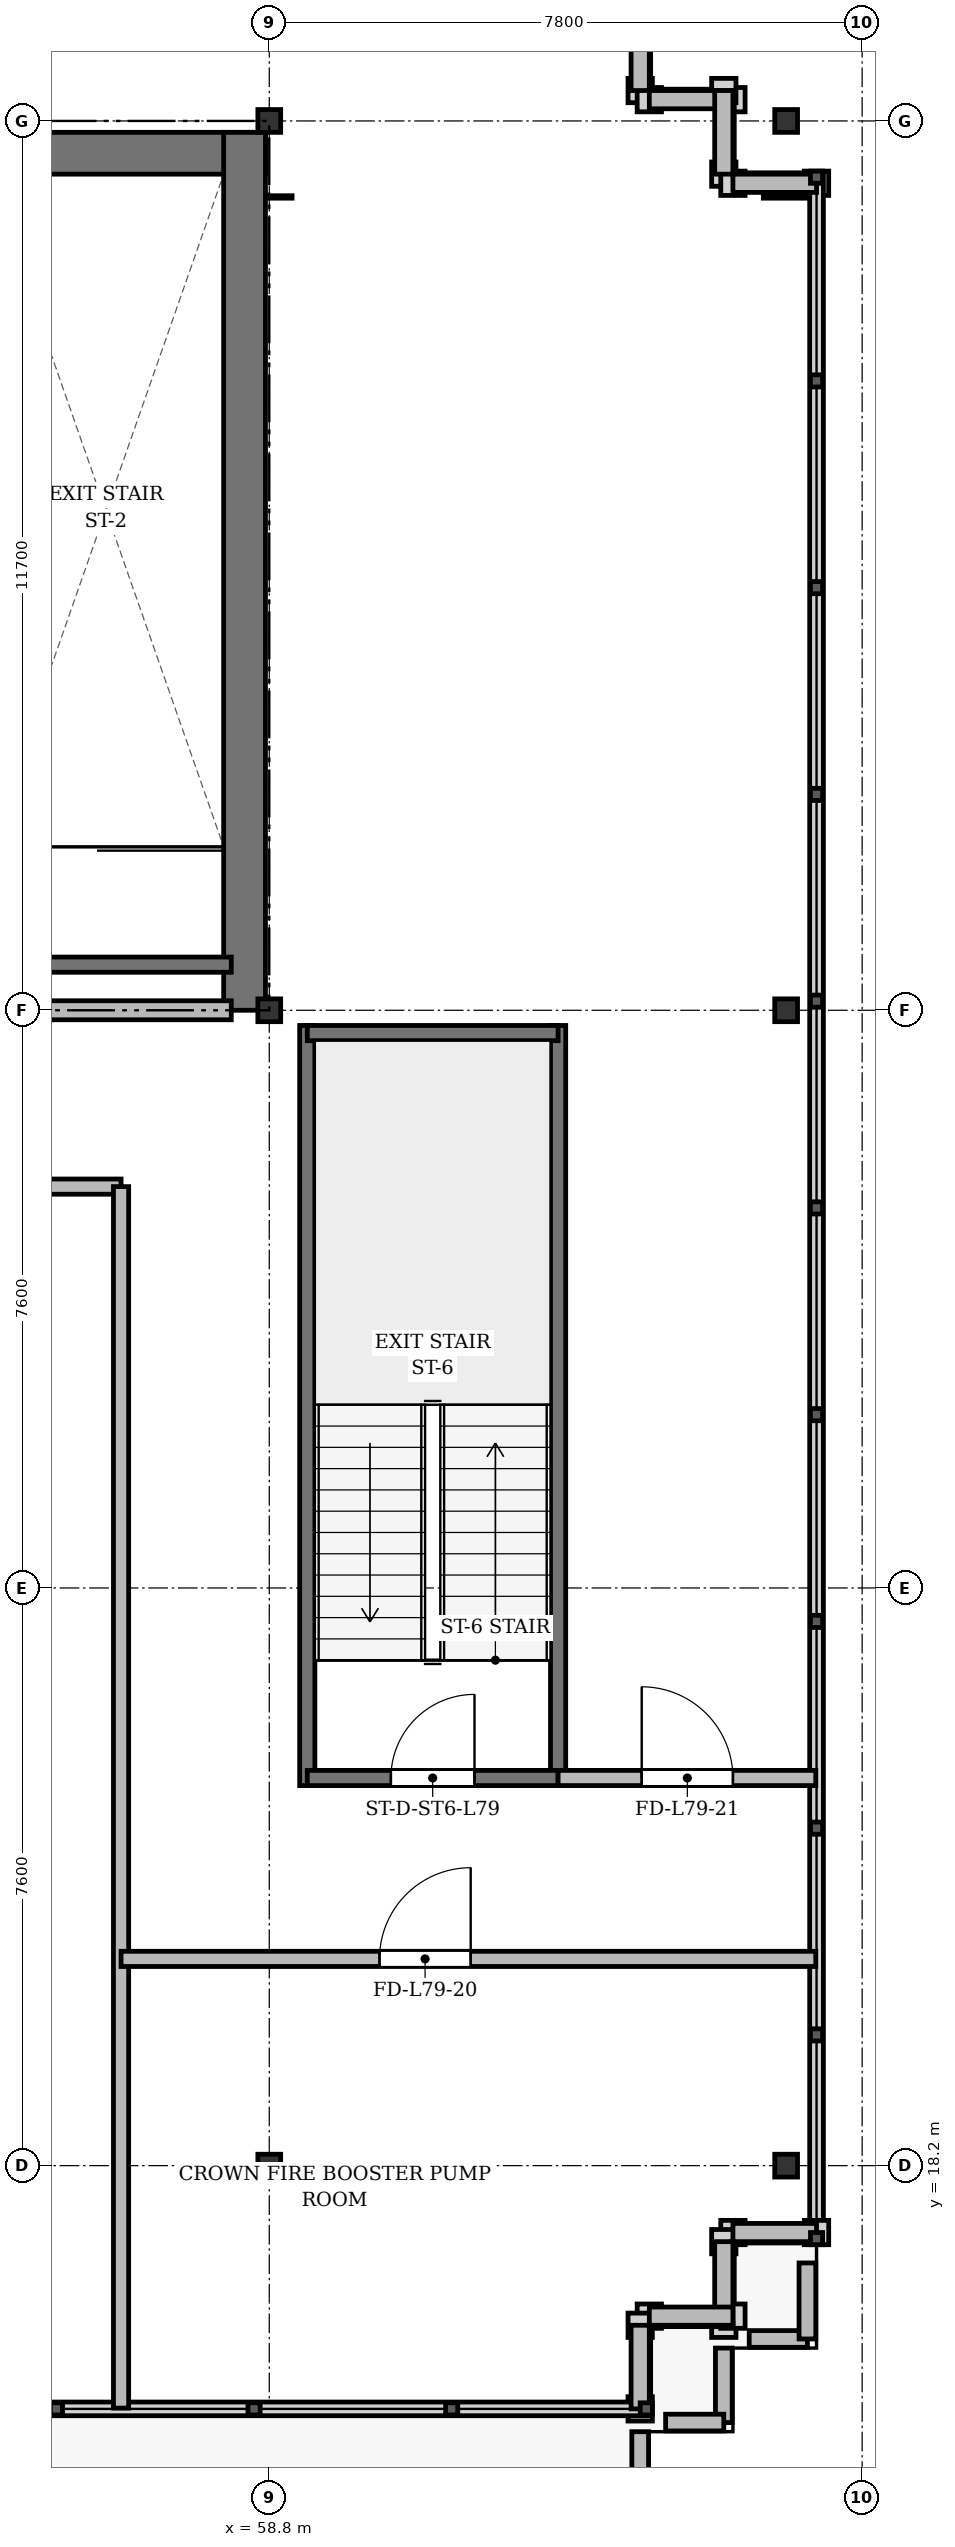
"""IFC4 building model, lengths in metres.
Left out: names, types, materials, properties, quantities, classifications, styles, units other than length and angle.
Written with IfcOpenShell. Run it as: python <this file> out.ifc"""

import sys

from ifc_helpers import new_model, si_unit, direction, frame, frame_2d, origin, origin_2d, place, context, subcontext, project, spatial, rectangle, i_section, extrude, source, transform, mapped, element, fill, save


model = new_model("IFC4")
c1 = context("Model", 3, precision=1e-05, world=origin(), true_north=direction((0.0, 1.0)))
c2 = subcontext(c1, "Body", "Model", "MODEL_VIEW")
j1 = project(units=[si_unit("LENGTHUNIT", "METRE"), si_unit("PLANEANGLEUNIT", "RADIAN")], contexts=[c1])
p1 = place(None, origin())
s1 = spatial("IfcSite", under=j1, at=p1, CompositionType="ELEMENT")
p2 = place(p1, origin())
s2 = spatial("IfcBuilding", under=s1, at=p2, CompositionType="ELEMENT")
p3 = place(p2, frame((0.0, 0.0, 303.5)))
s3 = spatial("IfcBuildingStorey", under=s2, at=p3, CompositionType="ELEMENT", Elevation=303.5)
m1 = source(origin(), c2, "Body", "SweptSolid", [
    extrude(i_section(OverallWidth=0.3, OverallDepth=0.3, WebThickness=0.015, FlangeThickness=0.024, at=origin_2d()), origin(), (0.0, 0.0, 1.0), 4.4),
])
for number, where, z_axis, x_axis in (
    (1, (58.8, 18.2, 0.0), (0.0, 0.0, 1.0), (1.0, 0.0, 0.0)),
    (2, (58.8, 33.4, 0.0), (0.0, 0.0, 1.0), (1.0, 0.0, 0.0)),
    (3, (58.8, 45.1, 0.0), (0.0, 0.0, 1.0), (1.0, 0.0, 0.0)),
    (4, (65.6, 18.2, 0.0), (0.0, 0.0, 1.0), (1.0, 0.0, 0.0)),
    (5, (65.6, 33.4, 0.0), (0.0, 0.0, 1.0), (1.0, 0.0, 0.0)),
    (6, (65.6, 45.1, 0.0), (0.0, 0.0, 1.0), (1.0, 0.0, 0.0)),
):
    element("IfcColumn", number, at=place(p3, frame(where, z_axis=z_axis, x_axis=x_axis)), inside=s3, PredefinedType="COLUMN", context=c2, shape_type="MappedRepresentation", body=[
        mapped(m1, transform((0.0, 0.0, 0.0), x_axis=(1.0, 0.0, 0.0), y_axis=(0.0, 1.0, 0.0), z_axis=(0.0, 0.0, 1.0), scale=1.0)),
    ])
p4 = place(p3, frame((63.68, 46.6, 0.0), z_axis=(0.0, 0.0, 1.0), x_axis=(0.0, -1.0, 0.0)))
e7 = element("IfcWall", 7, at=p4, inside=s3, PredefinedType="SOLIDWALL", context=c2, shape_type="SweptSolid", body=[
    extrude(rectangle(XDim=1.1, YDim=0.24, at=frame_2d((0.55, 0.0))), origin(), (0.0, 0.0, 1.0), 4.1),
])
p5 = place(p3, frame((63.8, 45.38, 0.0), z_axis=(0.0, 0.0, 1.0), x_axis=(1.0, 0.0, 0.0)))
e8 = element("IfcWall", 8, at=p5, inside=s3, PredefinedType="SOLIDWALL", context=c2, shape_type="SweptSolid", body=[
    extrude(rectangle(XDim=1.1, YDim=0.24, at=frame_2d((0.55, 0.0))), origin(), (0.0, 0.0, 1.0), 4.1),
])
for number, where, z_axis, x_axis in (
    (9, (64.78, 45.5, 0.0), (0.0, 0.0, 1.0), (0.0, -1.0, 0.0)),
    (10, (64.9, 44.28, 0.0), (0.0, 0.0, 1.0), (1.0, 0.0, 0.0)),
):
    element("IfcWall", number, at=place(p3, frame(where, z_axis=z_axis, x_axis=x_axis)), inside=s3, PredefinedType="SOLIDWALL", context=c2, shape_type="SweptSolid", body=[
        extrude(rectangle(XDim=1.1, YDim=0.24, at=frame_2d((0.55, 0.0))), origin(), (0.0, 0.0, 1.0), 3.6),
    ])
p6 = place(p3, frame((66.0, 17.32, 0.0), z_axis=(0.0, 0.0, 1.0), x_axis=(-1.0, 0.0, 0.0)))
e11 = element("IfcWall", 11, at=p6, inside=s3, PredefinedType="SOLIDWALL", context=c2, shape_type="SweptSolid", body=[
    extrude(rectangle(XDim=1.1, YDim=0.24, at=frame_2d((0.55, 0.0))), origin(), (0.0, 0.0, 1.0), 4.1),
])
for number, where, z_axis, x_axis in (
    (12, (64.78, 17.2, 0.0), (0.0, 0.0, 1.0), (0.0, -1.0, 0.0)),
    (13, (64.9, 16.22, 0.0), (0.0, 0.0, 1.0), (-1.0, 0.0, 0.0)),
):
    element("IfcWall", number, at=place(p3, frame(where, z_axis=z_axis, x_axis=x_axis)), inside=s3, PredefinedType="SOLIDWALL", context=c2, shape_type="SweptSolid", body=[
        extrude(rectangle(XDim=1.1, YDim=0.24, at=frame_2d((0.55, 0.0))), origin(), (0.0, 0.0, 1.0), 4.1),
    ])
p7 = place(p3, frame((63.68, 16.1, 0.0), z_axis=(0.0, 0.0, 1.0), x_axis=(0.0, -1.0, 0.0)))
e14 = element("IfcWall", 14, at=p7, inside=s3, PredefinedType="SOLIDWALL", context=c2, shape_type="SweptSolid", body=[
    extrude(rectangle(XDim=1.1, YDim=0.24, at=frame_2d((0.55, 0.0))), origin(), (0.0, 0.0, 1.0), 4.1),
])
p8 = place(p3, frame((65.88, 15.92, 0.0), z_axis=(0.0, 0.0, 1.0), x_axis=(-1.0, 0.0, 0.0)))
e15 = element("IfcWall", 15, at=p8, inside=s3, PredefinedType="PARAPET", context=c2, shape_type="SweptSolid", body=[
    extrude(rectangle(XDim=0.766, YDim=0.22, at=frame_2d((0.383, 0.0))), origin(), (0.0, 0.0, 1.0), 1.08),
])
p9 = place(p3, frame((64.78, 15.8, 0.0), z_axis=(0.0, 0.0, 1.0), x_axis=(0.0, -1.0, 0.0)))
e16 = element("IfcWall", 16, at=p9, inside=s3, PredefinedType="PARAPET", context=c2, shape_type="SweptSolid", body=[
    extrude(rectangle(XDim=0.98, YDim=0.22, at=frame_2d((0.49, 0.0))), origin(), (0.0, 0.0, 1.0), 1.08),
])
p10 = place(p3, frame((64.78, 14.82, 0.0), z_axis=(0.0, 0.0, 1.0), x_axis=(-1.0, 0.0, 0.0)))
e17 = element("IfcWall", 17, at=p10, inside=s3, PredefinedType="PARAPET", context=c2, shape_type="SweptSolid", body=[
    extrude(rectangle(XDim=0.766, YDim=0.22, at=frame_2d((0.383, 0.0))), origin(), (0.0, 0.0, 1.0), 1.08),
])
p11 = place(p3, frame((63.68, 14.7, 0.0), z_axis=(0.0, 0.0, 1.0), x_axis=(0.0, -1.0, 0.0)))
e18 = element("IfcWall", 18, at=p11, inside=s3, PredefinedType="PARAPET", context=c2, shape_type="SweptSolid", body=[
    extrude(rectangle(XDim=0.98, YDim=0.22, at=frame_2d((0.49, 0.0))), origin(), (0.0, 0.0, 1.0), 1.08),
])
p12 = place(p3, frame((65.88, 16.92, 0.0), z_axis=(0.0, 0.0, 1.0), x_axis=(0.0, -1.0, 0.0)))
e19 = element("IfcWall", 19, at=p12, inside=s3, PredefinedType="PARAPET", context=c2, shape_type="SweptSolid", body=[
    extrude(rectangle(XDim=1.0, YDim=0.22, at=frame_2d((0.5, 0.0))), origin(), (0.0, 0.0, 1.0), 1.08),
])
p13 = place(p3, frame((15.65, 44.675, 0.0), z_axis=(0.0, 0.0, 1.0), x_axis=(1.0, 0.0, 0.0)))
e20 = element("IfcWall", 20, at=p13, inside=s3, PredefinedType="SHEAR", context=c2, shape_type="SweptSolid", body=[
    extrude(rectangle(XDim=43.1, YDim=0.55, at=frame_2d((21.55, 0.0))), origin(), (0.0, 0.0, 1.0), 4.1),
])
p14 = place(p3, frame((58.475, 33.4, 0.0), z_axis=(0.0, 0.0, 1.0), x_axis=(0.0, 1.0, 0.0)))
e21 = element("IfcWall", 21, at=p14, inside=s3, PredefinedType="SHEAR", context=c2, shape_type="SweptSolid", body=[
    extrude(rectangle(XDim=11.55, YDim=0.55, at=frame_2d((5.775, 0.0))), origin(), (0.0, 0.0, 1.0), 4.1),
])
p15 = place(p3, frame((54.9, 34.0, 0.0), z_axis=(0.0, 0.0, 1.0), x_axis=(1.0, 0.0, 0.0)))
e22 = element("IfcWall", 22, at=p15, inside=s3, PredefinedType="SHEAR", context=c2, shape_type="SweptSolid", body=[
    extrude(rectangle(XDim=3.4, YDim=0.2, at=frame_2d((1.7, 0.0))), origin(), (0.0, 0.0, 1.0), 4.1),
])
for number, where, z_axis, x_axis in (
    (23, (59.3, 23.2, 0.0), (0.0, 0.0, 1.0), (0.0, 1.0, 0.0)),
    (24, (62.6, 23.2, 0.0), (0.0, 0.0, 1.0), (0.0, 1.0, 0.0)),
):
    element("IfcWall", number, at=place(p3, frame(where, z_axis=z_axis, x_axis=x_axis)), inside=s3, PredefinedType="SHEAR", context=c2, shape_type="SweptSolid", body=[
        extrude(rectangle(XDim=10.0, YDim=0.2, at=frame_2d((5.0, 0.0))), origin(), (0.0, 0.0, 1.0), 4.1),
    ])
p16 = place(p3, frame((59.3, 33.1, 0.0), z_axis=(0.0, 0.0, 1.0), x_axis=(1.0, 0.0, 0.0)))
e25 = element("IfcWall", 25, at=p16, inside=s3, PredefinedType="SHEAR", context=c2, shape_type="SweptSolid", body=[
    extrude(rectangle(XDim=3.3, YDim=0.2, at=frame_2d((1.65, 0.0))), origin(), (0.0, 0.0, 1.0), 4.1),
])
p17 = place(p3, frame((59.3, 23.3, 0.0), z_axis=(0.0, 0.0, 1.0), x_axis=(1.0, 0.0, 0.0)))
e26 = element("IfcWall", 26, at=p17, inside=s3, PredefinedType="SHEAR", context=c2, shape_type="SweptSolid", body=[
    extrude(rectangle(XDim=3.3, YDim=0.2, at=frame_2d((1.65, 0.0))), origin(), (0.0, 0.0, 1.0), 4.1),
])
p18 = place(p17, frame((1.1, 0.0, 0.0)))
e27 = element("IfcOpeningElement", 27, at=p18, cuts=e26, PredefinedType="OPENING", context=c2, shape_type="SweptSolid", body=[
    extrude(rectangle(XDim=1.1, YDim=2.15, at=frame_2d((0.55, 1.075))), frame((0.0, 0.11, 0.0), z_axis=(0.0, -1.0, 0.0), x_axis=(1.0, 0.0, 0.0)), (0.0, 0.0, 1.0), 0.22),
])
p19 = place(p3, frame((47.15, 33.4, 0.0), z_axis=(0.0, 0.0, 1.0), x_axis=(1.0, 0.0, 0.0)))
e28 = element("IfcWall", 28, at=p19, inside=s3, PredefinedType="PARTITIONING", context=c2, shape_type="SweptSolid", body=[
    extrude(rectangle(XDim=11.15, YDim=0.25, at=frame_2d((5.575, 0.0))), origin(), (0.0, 0.0, 1.0), 3.6),
])
p20 = place(p19, frame((0.7, 0.0, 0.0)))
e29 = element("IfcOpeningElement", 29, at=p20, cuts=e28, PredefinedType="OPENING", context=c2, shape_type="SweptSolid", body=[
    extrude(rectangle(XDim=0.95, YDim=2.15, at=frame_2d((0.475, 1.075))), frame((0.0, 0.135, 0.0), z_axis=(0.0, -1.0, 0.0), x_axis=(1.0, 0.0, 0.0)), (0.0, 0.0, 1.0), 0.27),
])
p21 = place(p19, frame((6.0, 0.0, 0.0)))
e30 = element("IfcOpeningElement", 30, at=p21, cuts=e28, PredefinedType="OPENING", context=c2, shape_type="SweptSolid", body=[
    extrude(rectangle(XDim=1.2, YDim=2.15, at=frame_2d((0.6, 1.075))), frame((0.0, 0.135, 0.0), z_axis=(0.0, -1.0, 0.0), x_axis=(1.0, 0.0, 0.0)), (0.0, 0.0, 1.0), 0.27),
])
p22 = place(p3, frame((42.38, 31.08, 0.0), z_axis=(0.0, 0.0, 1.0), x_axis=(1.0, 0.0, 0.0)))
e31 = element("IfcWall", 31, at=p22, inside=s3, PredefinedType="PARTITIONING", context=c2, shape_type="SweptSolid", body=[
    extrude(rectangle(XDim=14.47, YDim=0.2, at=frame_2d((7.235, 0.0))), origin(), (0.0, 0.0, 1.0), 3.6),
])
p23 = place(p22, frame((9.5, 0.0, 0.0)))
e32 = element("IfcOpeningElement", 32, at=p23, cuts=e31, PredefinedType="OPENING", context=c2, shape_type="SweptSolid", body=[
    extrude(rectangle(XDim=1.2, YDim=2.15, at=frame_2d((0.6, 1.075))), frame((0.0, 0.11, 0.0), z_axis=(0.0, -1.0, 0.0), x_axis=(1.0, 0.0, 0.0)), (0.0, 0.0, 1.0), 0.22),
])
p24 = place(p3, frame((56.85, 15.01, 0.0), z_axis=(0.0, 0.0, 1.0), x_axis=(0.0, 1.0, 0.0)))
e33 = element("IfcWall", 33, at=p24, inside=s3, PredefinedType="PARTITIONING", context=c2, shape_type="SweptSolid", body=[
    extrude(rectangle(XDim=16.07, YDim=0.2, at=frame_2d((8.035, 0.0))), origin(), (0.0, 0.0, 1.0), 3.6),
])
p25 = place(p3, frame((56.85, 20.92, 0.0), z_axis=(0.0, 0.0, 1.0), x_axis=(1.0, 0.0, 0.0)))
e34 = element("IfcWall", 34, at=p25, inside=s3, PredefinedType="PARTITIONING", context=c2, shape_type="SweptSolid", body=[
    extrude(rectangle(XDim=9.14, YDim=0.2, at=frame_2d((4.57, 0.0))), origin(), (0.0, 0.0, 1.0), 3.6),
])
p26 = place(p25, frame((3.4, 0.0, 0.0)))
e35 = element("IfcOpeningElement", 35, at=p26, cuts=e34, PredefinedType="OPENING", context=c2, shape_type="SweptSolid", body=[
    extrude(rectangle(XDim=1.2, YDim=2.15, at=frame_2d((0.6, 1.075))), frame((0.0, 0.11, 0.0), z_axis=(0.0, -1.0, 0.0), x_axis=(1.0, 0.0, 0.0)), (0.0, 0.0, 1.0), 0.22),
])
p27 = place(p3, frame((62.6, 23.3, 0.0), z_axis=(0.0, 0.0, 1.0), x_axis=(1.0, 0.0, 0.0)))
e36 = element("IfcWall", 36, at=p27, inside=s3, PredefinedType="PARTITIONING", context=c2, shape_type="SweptSolid", body=[
    extrude(rectangle(XDim=3.39, YDim=0.2, at=frame_2d((1.695, 0.0))), origin(), (0.0, 0.0, 1.0), 3.6),
])
p28 = place(p27, frame((1.1, 0.0, 0.0)))
e37 = element("IfcOpeningElement", 37, at=p28, cuts=e36, PredefinedType="OPENING", context=c2, shape_type="SweptSolid", body=[
    extrude(rectangle(XDim=1.2, YDim=2.15, at=frame_2d((0.6, 1.075))), frame((0.0, 0.11, 0.0), z_axis=(0.0, -1.0, 0.0), x_axis=(1.0, 0.0, 0.0)), (0.0, 0.0, 1.0), 0.22),
])
m2 = source(origin(), c2, "Body", "SweptSolid", [
    extrude(rectangle(XDim=1.1, YDim=2.15, at=frame_2d((0.55, 1.075))), frame((0.0, 0.025, 0.0), z_axis=(0.0, -1.0, 0.0), x_axis=(1.0, 0.0, 0.0)), (0.0, 0.0, 1.0), 0.05),
])
p29 = place(p18, origin())
e38 = element("IfcDoor", 38, at=p29, inside=s3, OperationType="SINGLE_SWING_RIGHT", PredefinedType="DOOR", context=c2, shape_type="MappedRepresentation", body=[
    mapped(m2, transform((0.0, 0.0, 0.0), x_axis=(1.0, 0.0, 0.0), y_axis=(0.0, 1.0, 0.0), z_axis=(0.0, 0.0, 1.0), scale=1.0)),
])
fill(e27, e38)
m3 = source(origin(), c2, "Body", "SweptSolid", [
    extrude(rectangle(XDim=1.2, YDim=2.15, at=frame_2d((0.6, 1.075))), frame((0.0, 0.025, 0.0), z_axis=(0.0, -1.0, 0.0), x_axis=(1.0, 0.0, 0.0)), (0.0, 0.0, 1.0), 0.05),
])
p30 = place(p26, origin())
e39 = element("IfcDoor", 39, at=p30, inside=s3, OperationType="SINGLE_SWING_RIGHT", PredefinedType="DOOR", context=c2, shape_type="MappedRepresentation", body=[
    mapped(m3, transform((0.0, 0.0, 0.0), x_axis=(1.0, 0.0, 0.0), y_axis=(0.0, 1.0, 0.0), z_axis=(0.0, 0.0, 1.0), scale=1.0)),
])
fill(e35, e39)
p31 = place(p28, origin())
e40 = element("IfcDoor", 40, at=p31, inside=s3, OperationType="SINGLE_SWING_LEFT", PredefinedType="DOOR", context=c2, shape_type="MappedRepresentation", body=[
    mapped(m3, transform((0.0, 0.0, 0.0), x_axis=(1.0, 0.0, 0.0), y_axis=(0.0, 1.0, 0.0), z_axis=(0.0, 0.0, 1.0), scale=1.0)),
])
fill(e37, e40)
save(model, sys.argv[1])
